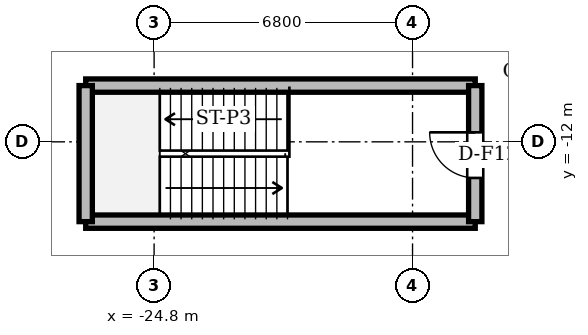
"""IFC4 building model, lengths in metres.
Left out: names, types, materials, properties, quantities, classifications, styles, units other than length and angle.
Written with IfcOpenShell. Run it as: python <this file> out.ifc"""

import sys

from ifc_helpers import new_model, si_unit, direction, frame, frame_2d, origin, origin_2d, place, context, subcontext, project, spatial, rectangle, extrude, source, transform, mapped, element, fill, save


model = new_model("IFC4")
c1 = context("Model", 3, precision=1e-05, world=origin(), true_north=direction((0.0, 1.0)))
c2 = subcontext(c1, "Body", "Model", "MODEL_VIEW")
j1 = project(units=[si_unit("LENGTHUNIT", "METRE"), si_unit("PLANEANGLEUNIT", "RADIAN")], contexts=[c1])
p1 = place(None, origin())
s1 = spatial("IfcSite", under=j1, at=p1, CompositionType="ELEMENT")
p2 = place(p1, origin())
s2 = spatial("IfcBuilding", under=s1, at=p2, CompositionType="ELEMENT")
p3 = place(p2, frame((0.0, 0.0, 18.6)))
s3 = spatial("IfcBuildingStorey", under=s2, at=p3, CompositionType="ELEMENT", Elevation=18.6)
for number, where, z_axis, x_axis in (
    (1, (-26.6, -10.52, 0.0), (0.0, 0.0, 1.0), (1.0, 0.0, 0.0)),
    (2, (-26.6, -14.1, 0.0), (0.0, 0.0, 1.0), (1.0, 0.0, 0.0)),
):
    element("IfcWall", number, at=place(p3, frame(where, z_axis=z_axis, x_axis=x_axis)), inside=s3, PredefinedType="SHEAR", context=c2, shape_type="SweptSolid", body=[
        extrude(rectangle(XDim=10.25, YDim=0.35, at=frame_2d((5.125, 0.0))), origin(), (0.0, 0.0, 1.0), 4.26),
    ])
p4 = place(p3, frame((-26.6, -14.1, 0.0), z_axis=(0.0, 0.0, 1.0), x_axis=(0.0, 1.0, 0.0)))
e3 = element("IfcWall", 3, at=p4, inside=s3, PredefinedType="SHEAR", context=c2, shape_type="SweptSolid", body=[
    extrude(rectangle(XDim=3.58, YDim=0.35, at=frame_2d((1.79, 0.0))), origin(), (0.0, 0.0, 1.0), 4.26),
])
p5 = place(p3, frame((-16.35, -14.1, 0.0), z_axis=(0.0, 0.0, 1.0), x_axis=(0.0, 1.0, 0.0)))
e4 = element("IfcWall", 4, at=p5, inside=s3, PredefinedType="SHEAR", context=c2, shape_type="SweptSolid", body=[
    extrude(rectangle(XDim=3.58, YDim=0.35, at=frame_2d((1.79, 0.0))), origin(), (0.0, 0.0, 1.0), 4.26),
])
p6 = place(p5, frame((1.15, 0.0, 0.0)))
e5 = element("IfcOpeningElement", 5, at=p6, cuts=e4, PredefinedType="OPENING", context=c2, shape_type="SweptSolid", body=[
    extrude(rectangle(XDim=1.2, YDim=2.2, at=frame_2d((0.6, 1.1))), frame((0.0, 0.185, 0.0), z_axis=(0.0, -1.0, 0.0), x_axis=(1.0, 0.0, 0.0)), (0.0, 0.0, 1.0), 0.37),
])
m1 = source(origin(), c2, "Body", "SweptSolid", [
    extrude(rectangle(XDim=1.2, YDim=0.05, at=origin_2d()), origin(), (0.0, 0.0, 1.0), 2.2),
])
p7 = place(p6, frame((0.6, 0.0, 0.0)))
e6 = element("IfcDoor", 6, at=p7, inside=s3, OperationType="SINGLE_SWING_RIGHT", PredefinedType="DOOR", context=c2, shape_type="MappedRepresentation", body=[
    mapped(m1, transform((0.0, 0.0, 0.0), scale=1.0)),
])
fill(e5, e6)
save(model, sys.argv[1])
